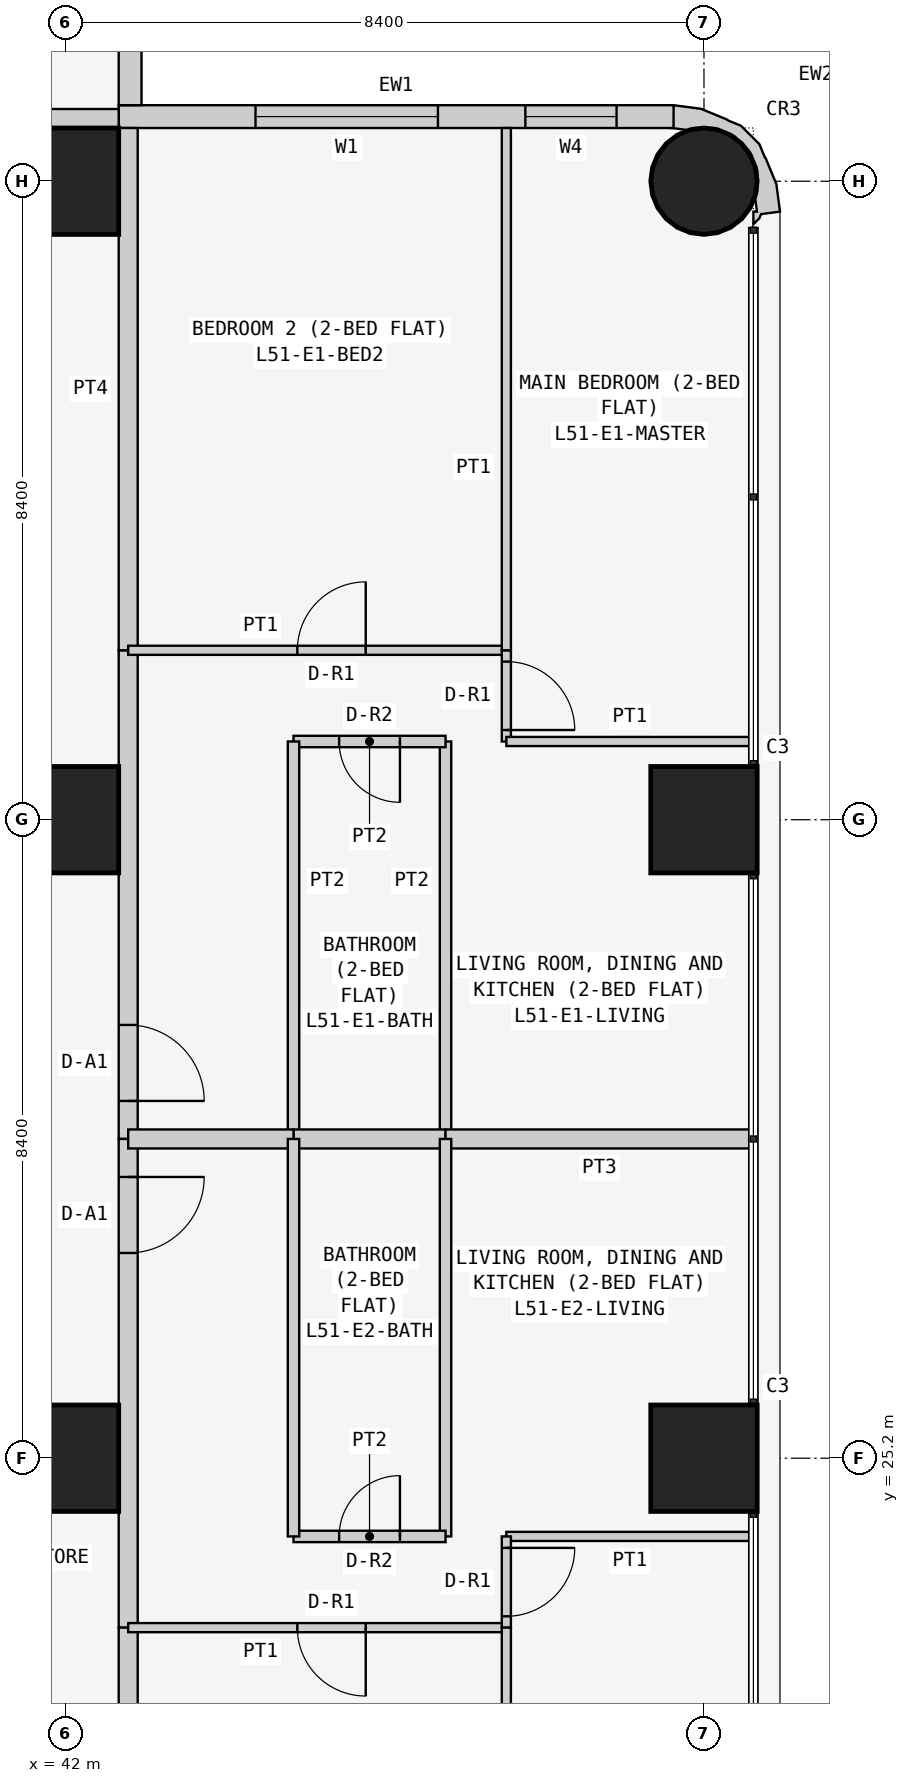
"""IFC4 building model, lengths in metres.
Left out: names, types, materials, properties, quantities, classifications, styles, units other than length and angle.
Written with IfcOpenShell. Run it as: python <this file> out.ifc"""

import sys

from ifc_helpers import new_model, si_unit, direction, frame, frame_2d, origin, origin_2d, place, context, subcontext, project, spatial, polyline, rectangle, circle, outline, extrude, element, fill, save


model = new_model("IFC4")
c1 = context("Model", 3, precision=1e-05, world=origin(), true_north=direction((0.0, 1.0)))
c2 = subcontext(c1, "Body", "Model", "MODEL_VIEW")
j1 = project(units=[si_unit("LENGTHUNIT", "METRE"), si_unit("PLANEANGLEUNIT", "RADIAN")], contexts=[c1])
p1 = place(None, origin())
s1 = spatial("IfcSite", under=j1, at=p1, CompositionType="ELEMENT")
p2 = place(p1, origin())
s2 = spatial("IfcBuilding", under=s1, at=p2, CompositionType="ELEMENT")
p3 = place(p2, frame((0.0, 0.0, 197.7)))
s3 = spatial("IfcBuildingStorey", under=s2, at=p3, CompositionType="ELEMENT", Elevation=197.7)
for number, where, z_axis, x_axis in (
    (1, (42.0, 25.2, 0.0), (0.0, 0.0, 1.0), (1.0, 0.0, 0.0)),
    (2, (42.0, 33.6, 0.0), (0.0, 0.0, 1.0), (1.0, 0.0, 0.0)),
    (3, (42.0, 42.0, 0.0), (0.0, 0.0, 1.0), (1.0, 0.0, 0.0)),
    (4, (50.4, 25.2, 0.0), (0.0, 0.0, 1.0), (1.0, 0.0, 0.0)),
    (5, (50.4, 33.6, 0.0), (0.0, 0.0, 1.0), (1.0, 0.0, 0.0)),
):
    element("IfcColumn", number, at=place(p3, frame(where, z_axis=z_axis, x_axis=x_axis)), inside=s3, PredefinedType="COLUMN", context=c2, shape_type="SweptSolid", body=[
        extrude(rectangle(XDim=1.4, YDim=1.4, at=origin_2d()), origin(), (0.0, 0.0, 1.0), 3.6),
    ])
p4 = place(p3, frame((50.4, 42.0, 0.0), z_axis=(0.0, 0.0, 1.0), x_axis=(1.0, 0.0, 0.0)))
e6 = element("IfcColumn", 6, at=p4, inside=s3, PredefinedType="COLUMN", context=c2, shape_type="SweptSolid", body=[
    extrude(circle(Radius=0.7, at=origin_2d()), origin(), (0.0, 0.0, 1.0), 3.6),
])
p5 = place(p3, frame((50.0, 42.85, 0.0), z_axis=(0.0, 0.0, 1.0), x_axis=(-1.0, 0.0, 0.0)))
e7 = element("IfcWall", 7, at=p5, inside=s3, PredefinedType="SOLIDWALL", context=c2, shape_type="SweptSolid", body=[
    extrude(rectangle(XDim=7.3, YDim=0.3, at=frame_2d((3.65, 0.0))), origin(), (0.0, 0.0, 1.0), 3.45),
])
p6 = place(p5, frame((3.1, 0.0, 0.9)))
e8 = element("IfcOpeningElement", 8, at=p6, cuts=e7, PredefinedType="OPENING", context=c2, shape_type="SweptSolid", body=[
    extrude(rectangle(XDim=2.4, YDim=1.5, at=frame_2d((1.2, 0.75))), frame((0.0, 0.16, 0.0), z_axis=(0.0, -1.0, 0.0), x_axis=(1.0, 0.0, 0.0)), (0.0, 0.0, 1.0), 0.32),
])
p7 = place(p5, frame((0.75, 0.0, 0.9)))
e9 = element("IfcOpeningElement", 9, at=p7, cuts=e7, PredefinedType="OPENING", context=c2, shape_type="SweptSolid", body=[
    extrude(rectangle(XDim=1.2, YDim=1.5, at=frame_2d((0.6, 0.75))), frame((0.0, 0.16, 0.0), z_axis=(0.0, -1.0, 0.0), x_axis=(1.0, 0.0, 0.0)), (0.0, 0.0, 1.0), 0.32),
])
p8 = place(p3, frame((42.85, 43.0, 0.0), z_axis=(0.0, 0.0, 1.0), x_axis=(0.0, 1.0, 0.0)))
e10 = element("IfcWall", 10, at=p8, inside=s3, PredefinedType="SOLIDWALL", context=c2, shape_type="SweptSolid", body=[
    extrude(rectangle(XDim=7.0, YDim=0.3, at=frame_2d((3.5, 0.0))), origin(), (0.0, 0.0, 1.0), 3.45),
])
p9 = place(p8, frame((1.5, 0.0, 0.9)))
e11 = element("IfcOpeningElement", 11, at=p9, cuts=e10, PredefinedType="OPENING", context=c2, shape_type="SweptSolid", body=[
    extrude(rectangle(XDim=2.4, YDim=1.5, at=frame_2d((1.2, 0.75))), frame((0.0, 0.16, 0.0), z_axis=(0.0, -1.0, 0.0), x_axis=(1.0, 0.0, 0.0)), (0.0, 0.0, 1.0), 0.32),
])
p10 = place(p8, frame((5.05, 0.0, 0.9)))
e12 = element("IfcOpeningElement", 12, at=p10, cuts=e10, PredefinedType="OPENING", context=c2, shape_type="SweptSolid", body=[
    extrude(rectangle(XDim=1.2, YDim=1.5, at=frame_2d((0.6, 0.75))), frame((0.0, 0.16, 0.0), z_axis=(0.0, -1.0, 0.0), x_axis=(1.0, 0.0, 0.0)), (0.0, 0.0, 1.0), 0.32),
])
p11 = place(p3, frame((50.988, 41.488, 0.0), z_axis=(0.0, 0.0, 1.0), x_axis=(0.898030234854, 0.439933741929, 0.0)))
e13 = element("IfcWall", 13, at=p11, inside=s3, PredefinedType="SOLIDWALL", context=c2, shape_type="SweptSolid", body=[
    extrude(outline(polyline([(0.138, -0.04), (0.182, -0.0), (0.419, -0.08), (0.536, 0.266), (0.559, 0.631), (0.555, 0.651), (0.566, 0.836), (0.455, 1.159), (0.333, 1.298), (0.324, 1.317), (0.082, 1.591), (-0.222, 1.793), (-0.39, 1.541), (-0.372, 1.532), (-0.195, 1.414), (-0.12, 1.41), (0.131, 1.287), (0.315, 1.078), (0.406, 0.814), (0.388, 0.536), (0.265, 0.285), (0.209, 0.235), (0.148, 0.053), (0.105, 0.074), (0.032, -0.076), (0.138, -0.04)])), origin(), (0.0, 0.0, 1.0), 3.45),
])
p12 = place(p3, frame((35.829, 42.825, 0.0), z_axis=(0.0, 0.0, 1.0), x_axis=(1.0, 0.0, 0.0)))
e14 = element("IfcWall", 14, at=p12, inside=s3, PredefinedType="PARTITIONING", context=c2, shape_type="SweptSolid", body=[
    extrude(rectangle(XDim=6.871, YDim=0.25, at=frame_2d((3.436, 0.0))), origin(), (0.0, 0.0, 1.0), 3.45),
])
p13 = place(p3, frame((42.825, 35.829, 0.0), z_axis=(0.0, 0.0, 1.0), x_axis=(0.0, -1.0, 0.0)))
e15 = element("IfcWall", 15, at=p13, inside=s3, PredefinedType="PARTITIONING", context=c2, shape_type="SweptSolid", body=[
    extrude(rectangle(XDim=6.429, YDim=0.25, at=frame_2d((3.215, 0.0))), origin(), (0.0, 0.0, 1.0), 3.45),
])
p14 = place(p13, frame((4.929, 0.0, 0.0)))
e16 = element("IfcOpeningElement", 16, at=p14, cuts=e15, PredefinedType="OPENING", context=c2, shape_type="SweptSolid", body=[
    extrude(rectangle(XDim=1.0, YDim=2.1, at=frame_2d((0.5, 1.05))), frame((0.0, 0.135, 0.0), z_axis=(0.0, -1.0, 0.0), x_axis=(1.0, 0.0, 0.0)), (0.0, 0.0, 1.0), 0.27),
])
p15 = place(p3, frame((42.825, 42.7, 0.0), z_axis=(0.0, 0.0, 1.0), x_axis=(0.0, -1.0, 0.0)))
e17 = element("IfcWall", 17, at=p15, inside=s3, PredefinedType="PARTITIONING", context=c2, shape_type="SweptSolid", body=[
    extrude(rectangle(XDim=6.871, YDim=0.25, at=frame_2d((3.436, 0.0))), origin(), (0.0, 0.0, 1.0), 3.45),
])
p16 = place(p3, frame((42.825, 29.4, 0.0), z_axis=(0.0, 0.0, 1.0), x_axis=(0.0, -1.0, 0.0)))
e18 = element("IfcWall", 18, at=p16, inside=s3, PredefinedType="PARTITIONING", context=c2, shape_type="SweptSolid", body=[
    extrude(rectangle(XDim=6.429, YDim=0.25, at=frame_2d((3.214, 0.0))), origin(), (0.0, 0.0, 1.0), 3.45),
])
p17 = place(p16, frame((0.5, 0.0, 0.0)))
e19 = element("IfcOpeningElement", 19, at=p17, cuts=e18, PredefinedType="OPENING", context=c2, shape_type="SweptSolid", body=[
    extrude(rectangle(XDim=1.0, YDim=2.1, at=frame_2d((0.5, 1.05))), frame((0.0, 0.135, 0.0), z_axis=(0.0, -1.0, 0.0), x_axis=(1.0, 0.0, 0.0)), (0.0, 0.0, 1.0), 0.27),
])
p18 = place(p3, frame((42.825, 22.971, 0.0), z_axis=(0.0, 0.0, 1.0), x_axis=(0.0, -1.0, 0.0)))
e20 = element("IfcWall", 20, at=p18, inside=s3, PredefinedType="PARTITIONING", context=c2, shape_type="SweptSolid", body=[
    extrude(rectangle(XDim=6.871, YDim=0.25, at=frame_2d((3.436, 0.0))), origin(), (0.0, 0.0, 1.0), 3.45),
])
p19 = place(p3, frame((47.0, 29.4, 0.0), z_axis=(0.0, 0.0, 1.0), x_axis=(0.0, 1.0, 0.0)))
e21 = element("IfcWall", 21, at=p19, inside=s3, PredefinedType="PARTITIONING", context=c2, shape_type="SweptSolid", body=[
    extrude(rectangle(XDim=5.229, YDim=0.15, at=frame_2d((2.615, 0.0))), origin(), (0.0, 0.0, 1.0), 3.45),
])
p20 = place(p3, frame((47.0, 34.629, 0.0), z_axis=(0.0, 0.0, 1.0), x_axis=(-1.0, 0.0, 0.0)))
e22 = element("IfcWall", 22, at=p20, inside=s3, PredefinedType="PARTITIONING", context=c2, shape_type="SweptSolid", body=[
    extrude(rectangle(XDim=2.0, YDim=0.15, at=frame_2d((1.0, 0.0))), origin(), (0.0, 0.0, 1.0), 3.45),
])
p21 = place(p20, frame((0.6, 0.0, 0.0)))
e23 = element("IfcOpeningElement", 23, at=p21, cuts=e22, PredefinedType="OPENING", context=c2, shape_type="SweptSolid", body=[
    extrude(rectangle(XDim=0.8, YDim=2.1, at=frame_2d((0.4, 1.05))), frame((0.0, 0.085, 0.0), z_axis=(0.0, -1.0, 0.0), x_axis=(1.0, 0.0, 0.0)), (0.0, 0.0, 1.0), 0.17),
])
p22 = place(p3, frame((45.0, 34.629, 0.0), z_axis=(0.0, 0.0, 1.0), x_axis=(0.0, -1.0, 0.0)))
e24 = element("IfcWall", 24, at=p22, inside=s3, PredefinedType="PARTITIONING", context=c2, shape_type="SweptSolid", body=[
    extrude(rectangle(XDim=5.229, YDim=0.15, at=frame_2d((2.615, 0.0))), origin(), (0.0, 0.0, 1.0), 3.45),
])
p23 = place(p3, frame((45.0, 29.4, 0.0), z_axis=(0.0, 0.0, 1.0), x_axis=(1.0, 0.0, 0.0)))
e25 = element("IfcWall", 25, at=p23, inside=s3, PredefinedType="PARTITIONING", context=c2, shape_type="SweptSolid", body=[
    extrude(rectangle(XDim=2.0, YDim=0.25, at=frame_2d((1.0, 0.0))), origin(), (0.0, 0.0, 1.0), 3.45),
])
p24 = place(p3, frame((42.825, 35.829, 0.0), z_axis=(0.0, 0.0, 1.0), x_axis=(1.0, 0.0, 0.0)))
e26 = element("IfcWall", 26, at=p24, inside=s3, PredefinedType="PARTITIONING", context=c2, shape_type="SweptSolid", body=[
    extrude(rectangle(XDim=4.975, YDim=0.12, at=frame_2d((2.488, 0.0))), origin(), (0.0, 0.0, 1.0), 3.45),
])
p25 = place(p24, frame((2.225, 0.0, 0.0)))
e27 = element("IfcOpeningElement", 27, at=p25, cuts=e26, PredefinedType="OPENING", context=c2, shape_type="SweptSolid", body=[
    extrude(rectangle(XDim=0.9, YDim=2.1, at=frame_2d((0.45, 1.05))), frame((0.0, 0.07, 0.0), z_axis=(0.0, -1.0, 0.0), x_axis=(1.0, 0.0, 0.0)), (0.0, 0.0, 1.0), 0.14),
])
p26 = place(p3, frame((47.8, 35.829, 0.0), z_axis=(0.0, 0.0, 1.0), x_axis=(0.0, -1.0, 0.0)))
e28 = element("IfcWall", 28, at=p26, inside=s3, PredefinedType="PARTITIONING", context=c2, shape_type="SweptSolid", body=[
    extrude(rectangle(XDim=1.2, YDim=0.12, at=frame_2d((0.6, 0.0))), origin(), (0.0, 0.0, 1.0), 3.45),
])
p27 = place(p26, frame((0.149, 0.0, 0.0)))
e29 = element("IfcOpeningElement", 29, at=p27, cuts=e28, PredefinedType="OPENING", context=c2, shape_type="SweptSolid", body=[
    extrude(rectangle(XDim=0.9, YDim=2.1, at=frame_2d((0.45, 1.05))), frame((0.0, 0.07, 0.0), z_axis=(0.0, -1.0, 0.0), x_axis=(1.0, 0.0, 0.0)), (0.0, 0.0, 1.0), 0.14),
])
p28 = place(p3, frame((47.8, 34.629, 0.0), z_axis=(0.0, 0.0, 1.0), x_axis=(1.0, 0.0, 0.0)))
e30 = element("IfcWall", 30, at=p28, inside=s3, PredefinedType="PARTITIONING", context=c2, shape_type="SweptSolid", body=[
    extrude(rectangle(XDim=3.25, YDim=0.12, at=frame_2d((1.625, 0.0))), origin(), (0.0, 0.0, 1.0), 3.45),
])
p29 = place(p3, frame((45.0, 29.4, 0.0), z_axis=(0.0, 0.0, 1.0), x_axis=(-1.0, 0.0, 0.0)))
e31 = element("IfcWall", 31, at=p29, inside=s3, PredefinedType="PARTITIONING", context=c2, shape_type="SweptSolid", body=[
    extrude(rectangle(XDim=2.175, YDim=0.25, at=frame_2d((1.087, 0.0))), origin(), (0.0, 0.0, 1.0), 3.45),
])
p30 = place(p3, frame((51.05, 29.4, 0.0), z_axis=(0.0, 0.0, 1.0), x_axis=(-1.0, 0.0, 0.0)))
e32 = element("IfcWall", 32, at=p30, inside=s3, PredefinedType="PARTITIONING", context=c2, shape_type="SweptSolid", body=[
    extrude(rectangle(XDim=4.05, YDim=0.25, at=frame_2d((2.025, 0.0))), origin(), (0.0, 0.0, 1.0), 3.45),
])
p31 = place(p3, frame((47.8, 35.829, 0.0), z_axis=(0.0, 0.0, 1.0), x_axis=(0.0, 1.0, 0.0)))
e33 = element("IfcWall", 33, at=p31, inside=s3, PredefinedType="PARTITIONING", context=c2, shape_type="SweptSolid", body=[
    extrude(rectangle(XDim=6.871, YDim=0.12, at=frame_2d((3.436, 0.0))), origin(), (0.0, 0.0, 1.0), 3.45),
])
p32 = place(p3, frame((47.0, 29.4, 0.0), z_axis=(0.0, 0.0, 1.0), x_axis=(0.0, -1.0, 0.0)))
e34 = element("IfcWall", 34, at=p32, inside=s3, PredefinedType="PARTITIONING", context=c2, shape_type="SweptSolid", body=[
    extrude(rectangle(XDim=5.229, YDim=0.15, at=frame_2d((2.615, 0.0))), origin(), (0.0, 0.0, 1.0), 3.45),
])
p33 = place(p3, frame((47.0, 24.171, 0.0), z_axis=(0.0, 0.0, 1.0), x_axis=(-1.0, 0.0, 0.0)))
e35 = element("IfcWall", 35, at=p33, inside=s3, PredefinedType="PARTITIONING", context=c2, shape_type="SweptSolid", body=[
    extrude(rectangle(XDim=2.0, YDim=0.15, at=frame_2d((1.0, 0.0))), origin(), (0.0, 0.0, 1.0), 3.45),
])
p34 = place(p33, frame((0.6, 0.0, 0.0)))
e36 = element("IfcOpeningElement", 36, at=p34, cuts=e35, PredefinedType="OPENING", context=c2, shape_type="SweptSolid", body=[
    extrude(rectangle(XDim=0.8, YDim=2.1, at=frame_2d((0.4, 1.05))), frame((0.0, 0.085, 0.0), z_axis=(0.0, -1.0, 0.0), x_axis=(1.0, 0.0, 0.0)), (0.0, 0.0, 1.0), 0.17),
])
p35 = place(p3, frame((45.0, 24.171, 0.0), z_axis=(0.0, 0.0, 1.0), x_axis=(0.0, 1.0, 0.0)))
e37 = element("IfcWall", 37, at=p35, inside=s3, PredefinedType="PARTITIONING", context=c2, shape_type="SweptSolid", body=[
    extrude(rectangle(XDim=5.229, YDim=0.15, at=frame_2d((2.615, 0.0))), origin(), (0.0, 0.0, 1.0), 3.45),
])
p36 = place(p3, frame((47.8, 22.971, 0.0), z_axis=(0.0, 0.0, 1.0), x_axis=(-1.0, 0.0, 0.0)))
e38 = element("IfcWall", 38, at=p36, inside=s3, PredefinedType="PARTITIONING", context=c2, shape_type="SweptSolid", body=[
    extrude(rectangle(XDim=4.975, YDim=0.12, at=frame_2d((2.488, 0.0))), origin(), (0.0, 0.0, 1.0), 3.45),
])
p37 = place(p36, frame((1.85, 0.0, 0.0)))
e39 = element("IfcOpeningElement", 39, at=p37, cuts=e38, PredefinedType="OPENING", context=c2, shape_type="SweptSolid", body=[
    extrude(rectangle(XDim=0.9, YDim=2.1, at=frame_2d((0.45, 1.05))), frame((0.0, 0.07, 0.0), z_axis=(0.0, -1.0, 0.0), x_axis=(1.0, 0.0, 0.0)), (0.0, 0.0, 1.0), 0.14),
])
p38 = place(p3, frame((51.05, 24.171, 0.0), z_axis=(0.0, 0.0, 1.0), x_axis=(-1.0, 0.0, 0.0)))
e40 = element("IfcWall", 40, at=p38, inside=s3, PredefinedType="PARTITIONING", context=c2, shape_type="SweptSolid", body=[
    extrude(rectangle(XDim=3.25, YDim=0.12, at=frame_2d((1.625, 0.0))), origin(), (0.0, 0.0, 1.0), 3.45),
])
p39 = place(p3, frame((47.8, 24.171, 0.0), z_axis=(0.0, 0.0, 1.0), x_axis=(0.0, -1.0, 0.0)))
e41 = element("IfcWall", 41, at=p39, inside=s3, PredefinedType="PARTITIONING", context=c2, shape_type="SweptSolid", body=[
    extrude(rectangle(XDim=1.2, YDim=0.12, at=frame_2d((0.6, 0.0))), origin(), (0.0, 0.0, 1.0), 3.45),
])
p40 = place(p39, frame((0.151, 0.0, 0.0)))
e42 = element("IfcOpeningElement", 42, at=p40, cuts=e41, PredefinedType="OPENING", context=c2, shape_type="SweptSolid", body=[
    extrude(rectangle(XDim=0.9, YDim=2.1, at=frame_2d((0.45, 1.05))), frame((0.0, 0.07, 0.0), z_axis=(0.0, -1.0, 0.0), x_axis=(1.0, 0.0, 0.0)), (0.0, 0.0, 1.0), 0.14),
])
p41 = place(p3, frame((47.8, 22.971, 0.0), z_axis=(0.0, 0.0, 1.0), x_axis=(0.0, -1.0, 0.0)))
e43 = element("IfcWall", 43, at=p41, inside=s3, PredefinedType="PARTITIONING", context=c2, shape_type="SweptSolid", body=[
    extrude(rectangle(XDim=6.871, YDim=0.12, at=frame_2d((3.436, 0.0))), origin(), (0.0, 0.0, 1.0), 3.45),
])
p42 = place(p6, origin())
e44 = element("IfcWindow", 44, at=p42, inside=s3, PartitioningType="SINGLE_PANEL", PredefinedType="WINDOW", context=c2, shape_type="SweptSolid", body=[
    extrude(rectangle(XDim=2.4, YDim=1.5, at=frame_2d((1.2, 0.75))), frame((0.0, 0.03, 0.0), z_axis=(0.0, -1.0, 0.0), x_axis=(1.0, 0.0, 0.0)), (0.0, 0.0, 1.0), 0.06),
])
fill(e8, e44)
p43 = place(p7, origin())
e45 = element("IfcWindow", 45, at=p43, inside=s3, PartitioningType="SINGLE_PANEL", PredefinedType="WINDOW", context=c2, shape_type="SweptSolid", body=[
    extrude(rectangle(XDim=1.2, YDim=1.5, at=frame_2d((0.6, 0.75))), frame((0.0, 0.03, 0.0), z_axis=(0.0, -1.0, 0.0), x_axis=(1.0, 0.0, 0.0)), (0.0, 0.0, 1.0), 0.06),
])
fill(e9, e45)
p44 = place(p14, origin())
e46 = element("IfcDoor", 46, at=p44, inside=s3, OperationType="SINGLE_SWING_RIGHT", PredefinedType="DOOR", context=c2, shape_type="SweptSolid", body=[
    extrude(rectangle(XDim=1.0, YDim=2.1, at=frame_2d((0.5, 1.05))), frame((0.0, 0.025, 0.0), z_axis=(0.0, -1.0, 0.0), x_axis=(1.0, 0.0, 0.0)), (0.0, 0.0, 1.0), 0.05),
])
fill(e16, e46)
p45 = place(p21, origin())
e47 = element("IfcDoor", 47, at=p45, inside=s3, OperationType="SINGLE_SWING_LEFT", PredefinedType="DOOR", context=c2, shape_type="SweptSolid", body=[
    extrude(rectangle(XDim=0.8, YDim=2.1, at=frame_2d((0.4, 1.05))), frame((0.0, 0.025, 0.0), z_axis=(0.0, -1.0, 0.0), x_axis=(1.0, 0.0, 0.0)), (0.0, 0.0, 1.0), 0.05),
])
fill(e23, e47)
p46 = place(p25, origin())
e48 = element("IfcDoor", 48, at=p46, inside=s3, OperationType="SINGLE_SWING_RIGHT", PredefinedType="DOOR", context=c2, shape_type="SweptSolid", body=[
    extrude(rectangle(XDim=0.9, YDim=2.1, at=frame_2d((0.45, 1.05))), frame((0.0, 0.025, 0.0), z_axis=(0.0, -1.0, 0.0), x_axis=(1.0, 0.0, 0.0)), (0.0, 0.0, 1.0), 0.05),
])
fill(e27, e48)
p47 = place(p27, origin())
e49 = element("IfcDoor", 49, at=p47, inside=s3, OperationType="SINGLE_SWING_RIGHT", PredefinedType="DOOR", context=c2, shape_type="SweptSolid", body=[
    extrude(rectangle(XDim=0.9, YDim=2.1, at=frame_2d((0.45, 1.05))), frame((0.0, 0.025, 0.0), z_axis=(0.0, -1.0, 0.0), x_axis=(1.0, 0.0, 0.0)), (0.0, 0.0, 1.0), 0.05),
])
fill(e29, e49)
p48 = place(p17, origin())
e50 = element("IfcDoor", 50, at=p48, inside=s3, OperationType="SINGLE_SWING_LEFT", PredefinedType="DOOR", context=c2, shape_type="SweptSolid", body=[
    extrude(rectangle(XDim=1.0, YDim=2.1, at=frame_2d((0.5, 1.05))), frame((0.0, 0.025, 0.0), z_axis=(0.0, -1.0, 0.0), x_axis=(1.0, 0.0, 0.0)), (0.0, 0.0, 1.0), 0.05),
])
fill(e19, e50)
p49 = place(p34, frame((0.8, 0.0, 0.0), z_axis=(0.0, 0.0, 1.0), x_axis=(-1.0, 0.0, 0.0)))
e51 = element("IfcDoor", 51, at=p49, inside=s3, OperationType="SINGLE_SWING_RIGHT", PredefinedType="DOOR", context=c2, shape_type="SweptSolid", body=[
    extrude(rectangle(XDim=0.8, YDim=2.1, at=frame_2d((0.4, 1.05))), frame((0.0, 0.025, 0.0), z_axis=(0.0, -1.0, 0.0), x_axis=(1.0, 0.0, 0.0)), (0.0, 0.0, 1.0), 0.05),
])
fill(e36, e51)
p50 = place(p37, origin())
e52 = element("IfcDoor", 52, at=p50, inside=s3, OperationType="SINGLE_SWING_LEFT", PredefinedType="DOOR", context=c2, shape_type="SweptSolid", body=[
    extrude(rectangle(XDim=0.9, YDim=2.1, at=frame_2d((0.45, 1.05))), frame((0.0, 0.025, 0.0), z_axis=(0.0, -1.0, 0.0), x_axis=(1.0, 0.0, 0.0)), (0.0, 0.0, 1.0), 0.05),
])
fill(e39, e52)
p51 = place(p40, origin())
e53 = element("IfcDoor", 53, at=p51, inside=s3, OperationType="SINGLE_SWING_LEFT", PredefinedType="DOOR", context=c2, shape_type="SweptSolid", body=[
    extrude(rectangle(XDim=0.9, YDim=2.1, at=frame_2d((0.45, 1.05))), frame((0.0, 0.025, 0.0), z_axis=(0.0, -1.0, 0.0), x_axis=(1.0, 0.0, 0.0)), (0.0, 0.0, 1.0), 0.05),
])
fill(e42, e53)
save(model, sys.argv[1])
